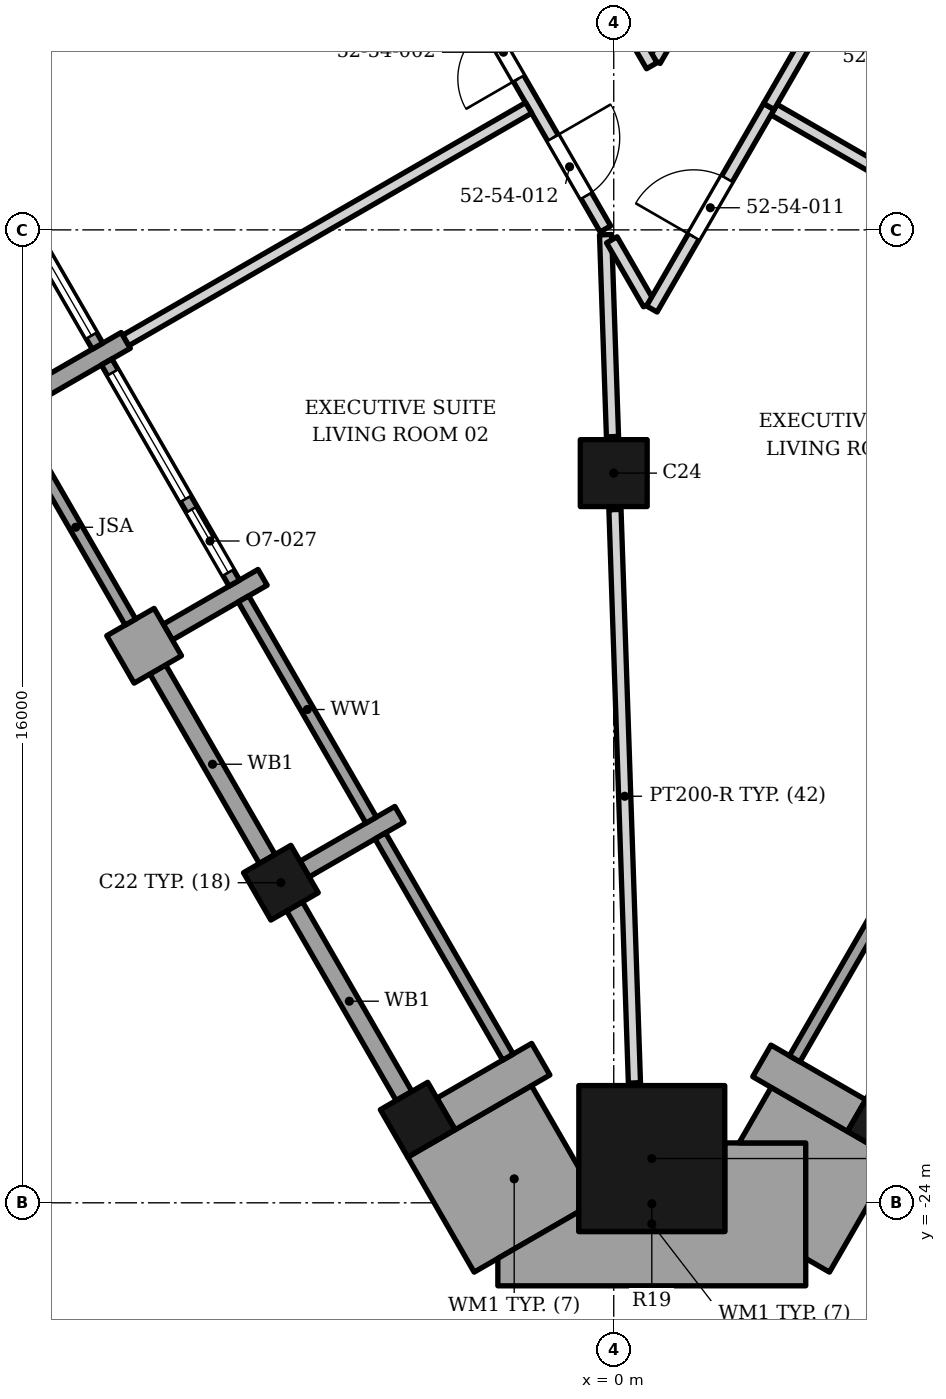
"""IFC4 building model, lengths in metres.
Left out: names, types, materials, properties, quantities, classifications, styles, units other than length and angle.
Written with IfcOpenShell. Run it as: python <this file> out.ifc"""

import sys

from ifc_helpers import new_model, si_unit, direction, frame, frame_2d, origin, origin_2d, place, context, subcontext, project, spatial, polyline, rectangle, outline, extrude, element, fill, save


model = new_model("IFC4")
c1 = context("Model", 3, precision=1e-05, world=origin(), true_north=direction((0.0, 1.0)))
c2 = subcontext(c1, "Body", "Model", "MODEL_VIEW")
j1 = project(units=[si_unit("LENGTHUNIT", "METRE"), si_unit("PLANEANGLEUNIT", "RADIAN")], contexts=[c1])
p1 = place(None, origin())
s1 = spatial("IfcSite", under=j1, at=p1, CompositionType="ELEMENT")
p2 = place(p1, origin())
s2 = spatial("IfcBuilding", under=s1, at=p2, CompositionType="ELEMENT")
p3 = place(p2, frame((0.0, 0.0, 219.8)))
s3 = spatial("IfcBuildingStorey", under=s2, at=p3, CompositionType="ELEMENT", Elevation=219.8)
p4 = place(p3, frame((0.626, -23.272, 0.0), z_axis=(0.0, 0.0, 1.0), x_axis=(0.0, 1.0, 0.0)))
e1 = element("IfcColumn", 1, at=p4, inside=s3, PredefinedType="COLUMN", context=c2, shape_type="SweptSolid", body=[
    extrude(rectangle(XDim=2.4, YDim=2.4, at=origin_2d()), origin(), (0.0, 0.0, 1.0), 3.9),
])
p5 = place(p3, frame((0.0, -12.0, 0.0), z_axis=(0.0, 0.0, 1.0), x_axis=(1.0, 0.0, 0.0)))
e2 = element("IfcColumn", 2, at=p5, inside=s3, PredefinedType="COLUMN", context=c2, shape_type="SweptSolid", body=[
    extrude(rectangle(XDim=1.1, YDim=1.1, at=origin_2d()), origin(), (0.0, 0.0, 1.0), 3.9),
])
for number, where, z_axis, x_axis in (
    (3, (-5.474, -18.736, 0.0), (0.0, 0.0, 1.0), (0.5, -0.866, 0.0)),
    (4, (-3.224, -22.633, 0.0), (0.0, 0.0, 1.0), (0.5, -0.866, 0.0)),
    (5, (4.459, -22.661, 0.0), (0.0, 0.0, 1.0), (0.5, 0.866, 0.0)),
):
    element("IfcColumn", number, at=place(p3, frame(where, z_axis=z_axis, x_axis=x_axis)), inside=s3, PredefinedType="COLUMN", context=c2, shape_type="SweptSolid", body=[
        extrude(rectangle(XDim=0.9, YDim=0.9, at=origin_2d()), origin(), (0.0, 0.0, 1.0), 3.9),
    ])
p6 = place(p3, frame((-9.584, -10.717, 0.0), z_axis=(0.0, 0.0, 1.0), x_axis=(0.866047807691, 0.499961193289, 0.0)))
e6 = element("IfcWall", 6, at=p6, inside=s3, PredefinedType="SOLIDWALL", context=c2, shape_type="SweptSolid", body=[
    extrude(rectangle(XDim=1.8, YDim=0.3, at=frame_2d((0.9, 0.0))), origin(), (0.0, 0.0, 1.0), 3.0),
])
p7 = place(p3, frame((-8.113, -15.064, 0.0), z_axis=(0.0, 0.0, 1.0), x_axis=(0.866081705922, 0.499902469156, 0.0)))
e7 = element("IfcWall", 7, at=p7, inside=s3, PredefinedType="SOLIDWALL", context=c2, shape_type="SweptSolid", body=[
    extrude(rectangle(XDim=0.9, YDim=0.9, at=frame_2d((0.45, 0.0))), origin(), (0.0, 0.0, 1.0), 3.0),
])
for number, where, z_axis, x_axis in (
    (8, (-7.334, -14.614, 0.0), (0.0, 0.0, 1.0), (0.866, 0.5, 0.0)),
    (9, (-5.084, -18.511, 0.0), (0.0, 0.0, 1.0), (0.866, 0.5, 0.0)),
):
    element("IfcWall", number, at=place(p3, frame(where, z_axis=z_axis, x_axis=x_axis)), inside=s3, PredefinedType="SOLIDWALL", context=c2, shape_type="SweptSolid", body=[
        extrude(rectangle(XDim=1.8, YDim=0.3, at=frame_2d((0.9, 0.0))), origin(), (0.0, 0.0, 1.0), 3.0),
    ])
p8 = place(p3, frame((-2.759, -22.538, 0.0), z_axis=(0.0, 0.0, 1.0), x_axis=(0.866047807691, 0.499961193289, 0.0)))
e10 = element("IfcWall", 10, at=p8, inside=s3, PredefinedType="SOLIDWALL", context=c2, shape_type="SweptSolid", body=[
    extrude(rectangle(XDim=1.8, YDim=0.6, at=frame_2d((0.9, 0.0))), origin(), (0.0, 0.0, 1.0), 3.0),
])
p9 = place(p3, frame((-10.59, -6.275, 0.0), z_axis=(0.0, 0.0, 1.0), x_axis=(0.49998411664, -0.866034573852, 0.0)))
e11 = element("IfcWall", 11, at=p9, inside=s3, PredefinedType="ELEMENTEDWALL", context=c2, shape_type="SweptSolid", body=[
    extrude(rectangle(XDim=4.2, YDim=0.2, at=frame_2d((2.1, 0.0))), origin(), (0.0, 0.0, 1.0), 3.0),
])
p10 = place(p9, frame((0.2, 0.0, 0.45)))
e12 = element("IfcOpeningElement", 12, at=p10, cuts=e11, PredefinedType="OPENING", context=c2, shape_type="SweptSolid", body=[
    extrude(rectangle(XDim=3.8, YDim=2.25, at=frame_2d((1.9, 1.125))), frame((0.0, 0.11, 0.0), z_axis=(0.0, -1.0, 0.0), x_axis=(1.0, 0.0, 0.0)), (0.0, 0.0, 1.0), 0.22),
])
p11 = place(p3, frame((-9.749, -11.332, 0.0), z_axis=(0.0, 0.0, 1.0), x_axis=(0.500012057535, -0.866018442252, 0.0)))
e13 = element("IfcWall", 13, at=p11, inside=s3, PredefinedType="SOLIDWALL", context=c2, shape_type="SweptSolid", body=[
    extrude(rectangle(XDim=3.6, YDim=0.2, at=frame_2d((1.8, 0.0))), origin(), (0.0, 0.0, 1.0), 3.0),
])
p12 = place(p3, frame((-8.34, -10.172, 0.0), z_axis=(0.0, 0.0, 1.0), x_axis=(0.499958946799, -0.866049104564, 0.0)))
e14 = element("IfcWall", 14, at=p12, inside=s3, PredefinedType="ELEMENTEDWALL", context=c2, shape_type="SweptSolid", body=[
    extrude(rectangle(XDim=4.2, YDim=0.2, at=frame_2d((2.1, 0.0))), origin(), (0.0, 0.0, 1.0), 2.95),
])
p13 = place(p12, frame((0.2, 0.0, 0.45)))
e15 = element("IfcOpeningElement", 15, at=p13, cuts=e14, PredefinedType="OPENING", context=c2, shape_type="SweptSolid", body=[
    extrude(rectangle(XDim=2.4, YDim=2.25, at=frame_2d((1.2, 1.125))), frame((0.0, 0.11, 0.0), z_axis=(0.0, -1.0, 0.0), x_axis=(1.0, 0.0, 0.0)), (0.0, 0.0, 1.0), 0.22),
])
p14 = place(p12, frame((2.8, 0.0, 0.0)))
e16 = element("IfcOpeningElement", 16, at=p14, cuts=e14, PredefinedType="OPENING", context=c2, shape_type="SweptSolid", body=[
    extrude(rectangle(XDim=1.2, YDim=2.7, at=frame_2d((0.6, 1.35))), frame((0.0, 0.11, 0.0), z_axis=(0.0, -1.0, 0.0), x_axis=(1.0, 0.0, 0.0)), (0.0, 0.0, 1.0), 0.22),
])
p15 = place(p3, frame((-5.699, -18.346, 0.0), z_axis=(0.0, 0.0, 1.0), x_axis=(-0.50001992892, 0.866013897511, 0.0)))
e17 = element("IfcWall", 17, at=p15, inside=s3, PredefinedType="SOLIDWALL", context=c2, shape_type="SweptSolid", body=[
    extrude(rectangle(XDim=3.599, YDim=0.3, at=frame_2d((1.8, 0.0))), origin(), (0.0, 0.0, 1.0), 3.0),
])
p16 = place(p3, frame((-6.09, -14.069, 0.0), z_axis=(0.0, 0.0, 1.0), x_axis=(0.49998411664, -0.866034573852, 0.0)))
e18 = element("IfcWall", 18, at=p16, inside=s3, PredefinedType="ELEMENTEDWALL", context=c2, shape_type="SweptSolid", body=[
    extrude(rectangle(XDim=4.2, YDim=0.2, at=frame_2d((2.1, 0.0))), origin(), (0.0, 0.0, 1.0), 3.0),
])
p17 = place(p3, frame((-3.449, -22.243, 0.0), z_axis=(0.0, 0.0, 1.0), x_axis=(-0.50001992892, 0.866013897511, 0.0)))
e19 = element("IfcWall", 19, at=p17, inside=s3, PredefinedType="SOLIDWALL", context=c2, shape_type="SweptSolid", body=[
    extrude(rectangle(XDim=3.599, YDim=0.3, at=frame_2d((1.8, 0.0))), origin(), (0.0, 0.0, 1.0), 3.0),
])
p18 = place(p3, frame((-3.84, -17.966, 0.0), z_axis=(0.0, 0.0, 1.0), x_axis=(0.49998411664, -0.866034573852, 0.0)))
e20 = element("IfcWall", 20, at=p18, inside=s3, PredefinedType="ELEMENTEDWALL", context=c2, shape_type="SweptSolid", body=[
    extrude(rectangle(XDim=4.2, YDim=0.2, at=frame_2d((2.1, 0.0))), origin(), (0.0, 0.0, 1.0), 3.0),
])
p19 = place(p3, frame((2.436, -21.666, 0.0), z_axis=(0.0, 0.0, 1.0), x_axis=(0.866013897511, -0.50001992892, 0.0)))
e21 = element("IfcWall", 21, at=p19, inside=s3, PredefinedType="SOLIDWALL", context=c2, shape_type="SweptSolid", body=[
    extrude(rectangle(XDim=1.8, YDim=0.6, at=frame_2d((0.9, 0.0))), origin(), (0.0, 0.0, 1.0), 3.0),
])
p20 = place(p3, frame((2.975, -21.631, 0.0), z_axis=(0.0, 0.0, 1.0), x_axis=(0.500002543286, 0.866023935413, 0.0)))
e22 = element("IfcWall", 22, at=p20, inside=s3, PredefinedType="ELEMENTEDWALL", context=c2, shape_type="SweptSolid", body=[
    extrude(rectangle(XDim=4.2, YDim=0.2, at=frame_2d((2.1, 0.0))), origin(), (0.0, 0.0, 1.0), 3.0),
])
p21 = place(p3, origin())
e23 = element("IfcWall", 23, at=p21, inside=s3, PredefinedType="SOLIDWALL", context=c2, shape_type="SweptSolid", body=[
    extrude(outline(polyline([(-0.574, -23.423), (-1.353, -22.073), (-3.388, -23.248), (-2.296, -25.14), (-0.574, -24.146), (-0.574, -23.423)])), origin(), (0.0, 0.0, 1.0), 3.0),
])
p22 = place(p3, origin())
e24 = element("IfcWall", 24, at=p22, inside=s3, PredefinedType="SOLIDWALL", context=c2, shape_type="SweptSolid", body=[
    extrude(outline(polyline([(1.826, -24.472), (-0.574, -24.472), (-0.574, -24.146), (-1.906, -24.915), (-1.906, -25.365), (3.158, -25.365), (3.158, -23.015), (1.826, -23.015), (1.826, -24.472)])), origin(), (0.0, 0.0, 1.0), 3.0),
])
p23 = place(p3, origin())
e25 = element("IfcWall", 25, at=p23, inside=s3, PredefinedType="SOLIDWALL", context=c2, shape_type="SweptSolid", body=[
    extrude(outline(polyline([(4.624, -23.276), (2.589, -22.101), (2.061, -23.015), (3.158, -23.015), (3.158, -24.915), (3.548, -25.14), (4.624, -23.276)])), origin(), (0.0, 0.0, 1.0), 3.0),
])
p24 = place(p3, frame((0.02, -12.6, 0.0), z_axis=(0.0, 0.0, 1.0), x_axis=(0.033928355038, -0.999424267628, 0.0)))
e26 = element("IfcWall", 26, at=p24, inside=s3, PredefinedType="PARTITIONING", context=c2, shape_type="SweptSolid", body=[
    extrude(rectangle(XDim=9.434, YDim=0.2, at=frame_2d((4.717, 0.0))), origin(), (0.0, 0.0, 1.0), 3.202),
])
p25 = place(p3, frame((-0.134, -8.08, 0.0), z_axis=(0.0, 0.0, 1.0), x_axis=(0.034171208609, -0.999415993719, 0.0)))
e27 = element("IfcWall", 27, at=p25, inside=s3, PredefinedType="PARTITIONING", context=c2, shape_type="SweptSolid", body=[
    extrude(rectangle(XDim=3.322, YDim=0.2, at=frame_2d((1.661, 0.0))), origin(), (0.0, 0.0, 1.0), 2.884),
])
p26 = place(p3, frame((2.635, -6.022, 0.0), z_axis=(0.0, 0.0, 1.0), x_axis=(0.866123944565, -0.499829283508, 0.0)))
e28 = element("IfcWall", 28, at=p26, inside=s3, PredefinedType="PARTITIONING", context=c2, shape_type="SweptSolid", body=[
    extrude(rectangle(XDim=7.65, YDim=0.2, at=frame_2d((3.825, 0.0))), origin(), (0.0, 0.0, 1.0), 2.884),
])
p27 = place(p3, frame((-0.031, -8.164, 0.0), z_axis=(0.0, 0.0, 1.0), x_axis=(0.500314465278, -0.865843771031, 0.0)))
e29 = element("IfcWall", 29, at=p27, inside=s3, PredefinedType="PARTITIONING", context=c2, shape_type="SweptSolid", body=[
    extrude(rectangle(XDim=1.214, YDim=0.2, at=frame_2d((0.607, 0.0))), origin(), (0.0, 0.0, 1.0), 2.884),
])
p28 = place(p3, frame((-5.815, 1.851, 0.0), z_axis=(0.0, 0.0, 1.0), x_axis=(0.499991042018, -0.866030575616, 0.0)))
e30 = element("IfcWall", 30, at=p28, inside=s3, PredefinedType="PARTITIONING", context=c2, shape_type="SweptSolid", body=[
    extrude(rectangle(XDim=11.357, YDim=0.2, at=frame_2d((5.678, 0.0))), origin(), (0.0, 0.0, 1.0), 2.884),
])
p29 = place(p28, frame((4.0, 0.0, 0.0)))
e31 = element("IfcOpeningElement", 31, at=p29, cuts=e30, PredefinedType="OPENING", context=c2, shape_type="SweptSolid", body=[
    extrude(rectangle(XDim=1.0, YDim=2.1, at=frame_2d((0.5, 1.05))), frame((0.0, 0.11, 0.0), z_axis=(0.0, -1.0, 0.0), x_axis=(1.0, 0.0, 0.0)), (0.0, 0.0, 1.0), 0.22),
])
p30 = place(p28, frame((7.501, 0.0, 0.0)))
e32 = element("IfcOpeningElement", 32, at=p30, cuts=e30, PredefinedType="OPENING", context=c2, shape_type="SweptSolid", body=[
    extrude(rectangle(XDim=1.0, YDim=2.1, at=frame_2d((0.5, 1.05))), frame((0.0, 0.11, 0.0), z_axis=(0.0, -1.0, 0.0), x_axis=(1.0, 0.0, 0.0)), (0.0, 0.0, 1.0), 0.22),
])
p31 = place(p28, frame((9.627, 0.0, 0.0)))
e33 = element("IfcOpeningElement", 33, at=p31, cuts=e30, PredefinedType="OPENING", context=c2, shape_type="SweptSolid", body=[
    extrude(rectangle(XDim=1.1, YDim=2.1, at=frame_2d((0.55, 1.05))), frame((0.0, 0.11, 0.0), z_axis=(0.0, -1.0, 0.0), x_axis=(1.0, 0.0, 0.0)), (0.0, 0.0, 1.0), 0.22),
])
p32 = place(p3, frame((-8.025, -9.817, 0.0), z_axis=(0.0, 0.0, 1.0), x_axis=(0.866115970796, 0.499843100514, 0.0)))
e34 = element("IfcWall", 34, at=p32, inside=s3, PredefinedType="PARTITIONING", context=c2, shape_type="SweptSolid", body=[
    extrude(rectangle(XDim=7.649, YDim=0.2, at=frame_2d((3.825, 0.0))), origin(), (0.0, 0.0, 1.0), 2.884),
])
p33 = place(p3, frame((0.626, -9.301, 0.0), z_axis=(0.0, 0.0, 1.0), x_axis=(0.500330475361, 0.865834519655, 0.0)))
e35 = element("IfcWall", 35, at=p33, inside=s3, PredefinedType="PARTITIONING", context=c2, shape_type="SweptSolid", body=[
    extrude(rectangle(XDim=3.846, YDim=0.2, at=frame_2d((1.923, 0.0))), origin(), (0.0, 0.0, 1.0), 3.73),
])
p34 = place(p33, frame((1.373, 0.0, 0.0)))
e36 = element("IfcOpeningElement", 36, at=p34, cuts=e35, PredefinedType="OPENING", context=c2, shape_type="SweptSolid", body=[
    extrude(rectangle(XDim=1.1, YDim=2.1, at=frame_2d((0.55, 1.05))), frame((0.0, 0.11, 0.0), z_axis=(0.0, -1.0, 0.0), x_axis=(1.0, 0.0, 0.0)), (0.0, 0.0, 1.0), 0.22),
])
p35 = place(p3, frame((0.676, -5.214, 0.0), z_axis=(0.0, 0.0, 1.0), x_axis=(0.499295729612, 0.866431632843, 0.0)))
e37 = element("IfcWall", 37, at=p35, inside=s3, PredefinedType="PARTITIONING", context=c2, shape_type="SweptSolid", body=[
    extrude(rectangle(XDim=8.586, YDim=0.2, at=frame_2d((4.293, 0.0))), origin(), (0.0, 0.0, 1.0), 2.884),
])
p36 = place(p3, frame((2.551, -5.971, 0.0), z_axis=(0.0, 0.0, 1.0), x_axis=(0.500007765274, 0.866020920455, 0.0)))
e38 = element("IfcWall", 38, at=p36, inside=s3, PredefinedType="PARTITIONING", context=c2, shape_type="SweptSolid", body=[
    extrude(rectangle(XDim=11.111, YDim=0.2, at=frame_2d((5.555, 0.0))), origin(), (0.0, 0.0, 1.0), 2.884),
])
p37 = place(p36, frame((4.0, 0.0, 0.0)))
e39 = element("IfcOpeningElement", 39, at=p37, cuts=e38, PredefinedType="OPENING", context=c2, shape_type="SweptSolid", body=[
    extrude(rectangle(XDim=1.0, YDim=2.1, at=frame_2d((0.5, 1.05))), frame((0.0, 0.11, 0.0), z_axis=(0.0, -1.0, 0.0), x_axis=(1.0, 0.0, 0.0)), (0.0, 0.0, 1.0), 0.22),
])
p38 = place(p36, frame((7.502, 0.0, 0.0)))
e40 = element("IfcOpeningElement", 40, at=p38, cuts=e38, PredefinedType="OPENING", context=c2, shape_type="SweptSolid", body=[
    extrude(rectangle(XDim=1.0, YDim=2.1, at=frame_2d((0.5, 1.05))), frame((0.0, 0.11, 0.0), z_axis=(0.0, -1.0, 0.0), x_axis=(1.0, 0.0, 0.0)), (0.0, 0.0, 1.0), 0.22),
])
p39 = place(p3, frame((-4.658, 3.852, 0.0), z_axis=(0.0, 0.0, 1.0), x_axis=(0.500012400782, -0.866018244071, 0.0)))
e41 = element("IfcWall", 41, at=p39, inside=s3, PredefinedType="PARTITIONING", context=c2, shape_type="SweptSolid", body=[
    extrude(rectangle(XDim=10.569, YDim=0.2, at=frame_2d((5.284, 0.0))), origin(), (0.0, 0.0, 1.0), 2.884),
])
p40 = place(p39, frame((4.784, 0.0, 0.0)))
e42 = element("IfcOpeningElement", 42, at=p40, cuts=e41, PredefinedType="OPENING", context=c2, shape_type="SweptSolid", body=[
    extrude(rectangle(XDim=1.0, YDim=2.1, at=frame_2d((0.5, 1.05))), frame((0.0, 0.11, 0.0), z_axis=(0.0, -1.0, 0.0), x_axis=(1.0, 0.0, 0.0)), (0.0, 0.0, 1.0), 0.22),
])
p41 = place(p10, origin())
e43 = element("IfcWindow", 43, at=p41, inside=s3, PartitioningType="SINGLE_PANEL", PredefinedType="WINDOW", context=c2, shape_type="SweptSolid", body=[
    extrude(rectangle(XDim=3.8, YDim=2.25, at=frame_2d((1.9, 1.125))), frame((0.0, 0.03, 0.0), z_axis=(0.0, -1.0, 0.0), x_axis=(1.0, 0.0, 0.0)), (0.0, 0.0, 1.0), 0.06),
])
fill(e12, e43)
p42 = place(p13, origin())
e44 = element("IfcWindow", 44, at=p42, inside=s3, PartitioningType="SINGLE_PANEL", PredefinedType="WINDOW", context=c2, shape_type="SweptSolid", body=[
    extrude(rectangle(XDim=2.4, YDim=2.25, at=frame_2d((1.2, 1.125))), frame((0.0, 0.03, 0.0), z_axis=(0.0, -1.0, 0.0), x_axis=(1.0, 0.0, 0.0)), (0.0, 0.0, 1.0), 0.06),
])
fill(e15, e44)
p43 = place(p14, origin())
e45 = element("IfcDoor", 45, at=p43, inside=s3, OperationType="SINGLE_SWING_LEFT", PredefinedType="DOOR", context=c2, shape_type="SweptSolid", body=[
    extrude(rectangle(XDim=1.2, YDim=2.7, at=frame_2d((0.6, 1.35))), frame((0.0, 0.025, 0.0), z_axis=(0.0, -1.0, 0.0), x_axis=(1.0, 0.0, 0.0)), (0.0, 0.0, 1.0), 0.05),
])
fill(e16, e45)
p44 = place(p30, origin())
e46 = element("IfcDoor", 46, at=p44, inside=s3, OperationType="SINGLE_SWING_RIGHT", PredefinedType="DOOR", context=c2, shape_type="SweptSolid", body=[
    extrude(rectangle(XDim=1.0, YDim=2.1, at=frame_2d((0.5, 1.05))), frame((0.0, 0.025, 0.0), z_axis=(0.0, -1.0, 0.0), x_axis=(1.0, 0.0, 0.0)), (0.0, 0.0, 1.0), 0.05),
])
fill(e32, e46)
p45 = place(p34, origin())
e47 = element("IfcDoor", 47, at=p45, inside=s3, OperationType="SINGLE_SWING_LEFT", PredefinedType="DOOR", context=c2, shape_type="SweptSolid", body=[
    extrude(rectangle(XDim=1.1, YDim=2.1, at=frame_2d((0.55, 1.05))), frame((0.0, 0.025, 0.0), z_axis=(0.0, -1.0, 0.0), x_axis=(1.0, 0.0, 0.0)), (0.0, 0.0, 1.0), 0.05),
])
fill(e36, e47)
p46 = place(p31, origin())
e48 = element("IfcDoor", 48, at=p46, inside=s3, OperationType="SINGLE_SWING_LEFT", PredefinedType="DOOR", context=c2, shape_type="SweptSolid", body=[
    extrude(rectangle(XDim=1.1, YDim=2.1, at=frame_2d((0.55, 1.05))), frame((0.0, 0.025, 0.0), z_axis=(0.0, -1.0, 0.0), x_axis=(1.0, 0.0, 0.0)), (0.0, 0.0, 1.0), 0.05),
])
fill(e33, e48)
save(model, sys.argv[1])
